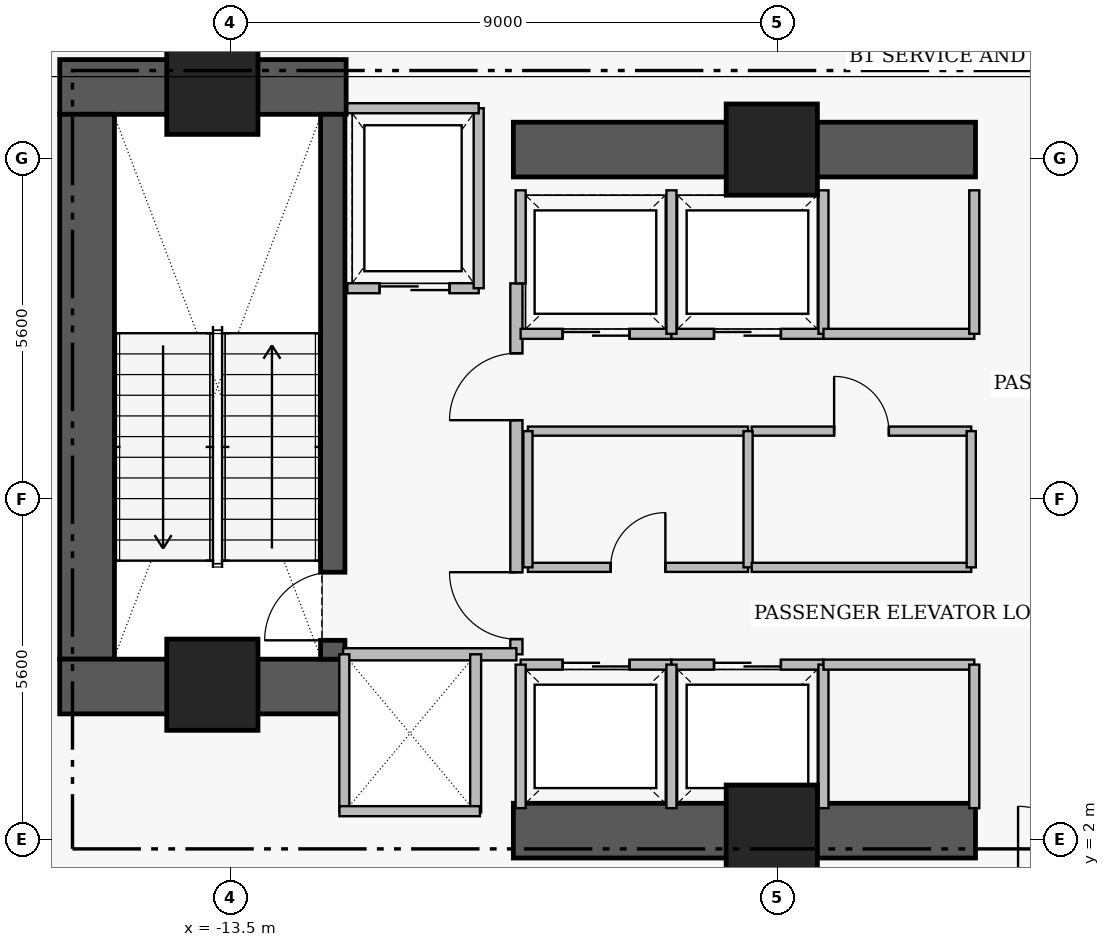
"""IFC4 building model, lengths in metres.
Left out: names, types, materials, properties, quantities, classifications, styles, units other than length and angle.
Written with IfcOpenShell. Run it as: python <this file> out.ifc"""

import sys

from ifc_helpers import new_model, si_unit, direction, frame, frame_2d, origin, origin_2d, place, context, subcontext, project, spatial, rectangle, extrude, element, fill, save


model = new_model("IFC4")
c1 = context("Model", 3, precision=1e-05, world=origin(), true_north=direction((0.0, 1.0)))
c2 = subcontext(c1, "Body", "Model", "MODEL_VIEW")
j1 = project(units=[si_unit("LENGTHUNIT", "METRE"), si_unit("PLANEANGLEUNIT", "RADIAN")], contexts=[c1])
p1 = place(None, origin())
s1 = spatial("IfcSite", under=j1, at=p1, CompositionType="ELEMENT")
p2 = place(p1, origin())
s2 = spatial("IfcBuilding", under=s1, at=p2, CompositionType="ELEMENT")
p3 = place(p2, frame((0.0, 0.0, -4.5)))
s3 = spatial("IfcBuildingStorey", under=s2, at=p3, CompositionType="ELEMENT", Elevation=-4.5)
p4 = place(p3, frame((-16.31, 14.38, 0.0), z_axis=(0.0, 0.0, 1.0), x_axis=(1.0, 0.0, 0.0)))
e1 = element("IfcWall", 1, at=p4, inside=s3, PredefinedType="SHEAR", context=c2, shape_type="SweptSolid", body=[
    extrude(rectangle(XDim=4.71, YDim=0.9, at=frame_2d((2.355, 0.0))), origin(), (0.0, 0.0, 1.0), 4.31),
])
p5 = place(p3, frame((-15.86, 4.97, 0.0), z_axis=(0.0, 0.0, 1.0), x_axis=(0.0, 1.0, 0.0)))
e2 = element("IfcWall", 2, at=p5, inside=s3, PredefinedType="SHEAR", context=c2, shape_type="SweptSolid", body=[
    extrude(rectangle(XDim=8.96, YDim=0.9, at=frame_2d((4.48, 0.0))), origin(), (0.0, 0.0, 1.0), 4.31),
])
p6 = place(p3, frame((-16.31, 4.52, 0.0), z_axis=(0.0, 0.0, 1.0), x_axis=(1.0, 0.0, 0.0)))
e3 = element("IfcWall", 3, at=p6, inside=s3, PredefinedType="SHEAR", context=c2, shape_type="SweptSolid", body=[
    extrude(rectangle(XDim=4.71, YDim=0.9, at=frame_2d((2.355, 0.0))), origin(), (0.0, 0.0, 1.0), 4.31),
])
for number, where, z_axis, x_axis in (
    (4, (-8.85, 2.15, 0.0), (0.0, 0.0, 1.0), (1.0, 0.0, 0.0)),
    (5, (-8.85, 13.35, 0.0), (0.0, 0.0, 1.0), (1.0, 0.0, 0.0)),
):
    element("IfcWall", number, at=place(p3, frame(where, z_axis=z_axis, x_axis=x_axis)), inside=s3, PredefinedType="SHEAR", context=c2, shape_type="SweptSolid", body=[
        extrude(rectangle(XDim=7.6, YDim=0.9, at=frame_2d((3.8, 0.0))), origin(), (0.0, 0.0, 1.0), 4.24),
    ])
p7 = place(p3, frame((-11.82, 4.97, 0.0), z_axis=(0.0, 0.0, 1.0), x_axis=(0.0, 1.0, 0.0)))
e6 = element("IfcWall", 6, at=p7, inside=s3, PredefinedType="SHEAR", context=c2, shape_type="SweptSolid", body=[
    extrude(rectangle(XDim=8.96, YDim=0.4, at=frame_2d((4.48, 0.0))), origin(), (0.0, 0.0, 1.0), 4.31),
])
p8 = place(p7, frame((0.31, 0.0, 0.0)))
e7 = element("IfcOpeningElement", 7, at=p8, cuts=e6, PredefinedType="OPENING", context=c2, shape_type="SweptSolid", body=[
    extrude(rectangle(XDim=1.12, YDim=2.22, at=frame_2d((0.56, 1.11))), frame((0.0, 0.21, 0.0), z_axis=(0.0, -1.0, 0.0), x_axis=(1.0, 0.0, 0.0)), (0.0, 0.0, 1.0), 0.42),
])
for number, where, z_axis, x_axis in (
    (8, (-13.8, 14.35, 0.0), (0.0, 0.0, 1.0), (1.0, 0.0, 0.0)),
    (9, (-4.6, 13.35, 0.0), (0.0, 0.0, 1.0), (1.0, 0.0, 0.0)),
    (10, (-13.8, 4.55, 0.0), (0.0, 0.0, 1.0), (1.0, 0.0, 0.0)),
    (11, (-4.6, 2.15, 0.0), (0.0, 0.0, 1.0), (1.0, 0.0, 0.0)),
):
    element("IfcColumn", number, at=place(p3, frame(where, z_axis=z_axis, x_axis=x_axis)), inside=s3, PredefinedType="COLUMN", context=c2, shape_type="SweptSolid", body=[
        extrude(rectangle(XDim=1.5, YDim=1.5, at=origin_2d()), origin(), (0.0, 0.0, 1.0), 4.5),
    ])
p9 = place(p3, frame((-8.8, 5.05, 0.0), z_axis=(0.0, 0.0, 1.0), x_axis=(0.0, 1.0, 0.0)))
e12 = element("IfcWall", 12, at=p9, inside=s3, PredefinedType="PARTITIONING", context=c2, shape_type="SweptSolid", body=[
    extrude(rectangle(XDim=6.1, YDim=0.2, at=frame_2d((3.05, 0.0))), origin(), (0.0, 0.0, 1.0), 4.24),
])
p10 = place(p9, frame((0.25, 0.0, 0.0)))
e13 = element("IfcOpeningElement", 13, at=p10, cuts=e12, PredefinedType="OPENING", context=c2, shape_type="SweptSolid", body=[
    extrude(rectangle(XDim=1.1, YDim=2.2, at=frame_2d((0.55, 1.1))), frame((0.0, 0.11, 0.0), z_axis=(0.0, -1.0, 0.0), x_axis=(1.0, 0.0, 0.0)), (0.0, 0.0, 1.0), 0.22),
])
p11 = place(p9, frame((3.85, 0.0, 0.0)))
e14 = element("IfcOpeningElement", 14, at=p11, cuts=e12, PredefinedType="OPENING", context=c2, shape_type="SweptSolid", body=[
    extrude(rectangle(XDim=1.1, YDim=2.2, at=frame_2d((0.55, 1.1))), frame((0.0, 0.11, 0.0), z_axis=(0.0, -1.0, 0.0), x_axis=(1.0, 0.0, 0.0)), (0.0, 0.0, 1.0), 0.22),
])
p12 = place(p3, frame((-11.58, 11.07, 0.0), z_axis=(0.0, 0.0, 1.0), x_axis=(1.0, 0.0, 0.0)))
e15 = element("IfcWall", 15, at=p12, inside=s3, PredefinedType="PARTITIONING", context=c2, shape_type="SweptSolid", body=[
    extrude(rectangle(XDim=2.16, YDim=0.165, at=frame_2d((1.08, 0.0))), origin(), (0.0, 0.0, 1.0), 4.24),
])
p13 = place(p12, frame((0.53, 0.0, 0.0)))
e16 = element("IfcOpeningElement", 16, at=p13, cuts=e15, PredefinedType="OPENING", context=c2, shape_type="SweptSolid", body=[
    extrude(rectangle(XDim=1.15, YDim=2.25, at=frame_2d((0.575, 1.125))), frame((0.0, 0.093, 0.0), z_axis=(0.0, -1.0, 0.0), x_axis=(1.0, 0.0, 0.0)), (0.0, 0.0, 1.0), 0.185),
])
p14 = place(p3, frame((-8.73, 4.88, 0.0), z_axis=(0.0, 0.0, 1.0), x_axis=(1.0, 0.0, 0.0)))
e17 = element("IfcWall", 17, at=p14, inside=s3, PredefinedType="PARTITIONING", context=c2, shape_type="SweptSolid", body=[
    extrude(rectangle(XDim=2.48, YDim=0.165, at=frame_2d((1.24, 0.0))), origin(), (0.0, 0.0, 1.0), 4.24),
])
p15 = place(p14, frame((0.69, 0.0, 0.0)))
e18 = element("IfcOpeningElement", 18, at=p15, cuts=e17, PredefinedType="OPENING", context=c2, shape_type="SweptSolid", body=[
    extrude(rectangle(XDim=1.1, YDim=2.25, at=frame_2d((0.55, 1.125))), frame((0.0, 0.093, 0.0), z_axis=(0.0, -1.0, 0.0), x_axis=(1.0, 0.0, 0.0)), (0.0, 0.0, 1.0), 0.185),
])
p16 = place(p3, frame((-6.25, 4.88, 0.0), z_axis=(0.0, 0.0, 1.0), x_axis=(1.0, 0.0, 0.0)))
e19 = element("IfcWall", 19, at=p16, inside=s3, PredefinedType="PARTITIONING", context=c2, shape_type="SweptSolid", body=[
    extrude(rectangle(XDim=2.5, YDim=0.165, at=frame_2d((1.25, 0.0))), origin(), (0.0, 0.0, 1.0), 4.24),
])
p17 = place(p16, frame((0.7, 0.0, 0.0)))
e20 = element("IfcOpeningElement", 20, at=p17, cuts=e19, PredefinedType="OPENING", context=c2, shape_type="SweptSolid", body=[
    extrude(rectangle(XDim=1.1, YDim=2.25, at=frame_2d((0.55, 1.125))), frame((0.0, 0.093, 0.0), z_axis=(0.0, -1.0, 0.0), x_axis=(1.0, 0.0, 0.0)), (0.0, 0.0, 1.0), 0.185),
])
p18 = place(p3, frame((-8.73, 10.32, 0.0), z_axis=(0.0, 0.0, 1.0), x_axis=(1.0, 0.0, 0.0)))
e21 = element("IfcWall", 21, at=p18, inside=s3, PredefinedType="PARTITIONING", context=c2, shape_type="SweptSolid", body=[
    extrude(rectangle(XDim=2.48, YDim=0.165, at=frame_2d((1.24, 0.0))), origin(), (0.0, 0.0, 1.0), 4.24),
])
p19 = place(p18, frame((0.69, 0.0, 0.0)))
e22 = element("IfcOpeningElement", 22, at=p19, cuts=e21, PredefinedType="OPENING", context=c2, shape_type="SweptSolid", body=[
    extrude(rectangle(XDim=1.1, YDim=2.25, at=frame_2d((0.55, 1.125))), frame((0.0, 0.093, 0.0), z_axis=(0.0, -1.0, 0.0), x_axis=(1.0, 0.0, 0.0)), (0.0, 0.0, 1.0), 0.185),
])
p20 = place(p3, frame((-6.25, 10.32, 0.0), z_axis=(0.0, 0.0, 1.0), x_axis=(1.0, 0.0, 0.0)))
e23 = element("IfcWall", 23, at=p20, inside=s3, PredefinedType="PARTITIONING", context=c2, shape_type="SweptSolid", body=[
    extrude(rectangle(XDim=2.5, YDim=0.165, at=frame_2d((1.25, 0.0))), origin(), (0.0, 0.0, 1.0), 4.24),
])
p21 = place(p20, frame((0.7, 0.0, 0.0)))
e24 = element("IfcOpeningElement", 24, at=p21, cuts=e23, PredefinedType="OPENING", context=c2, shape_type="SweptSolid", body=[
    extrude(rectangle(XDim=1.1, YDim=2.25, at=frame_2d((0.55, 1.125))), frame((0.0, 0.093, 0.0), z_axis=(0.0, -1.0, 0.0), x_axis=(1.0, 0.0, 0.0)), (0.0, 0.0, 1.0), 0.185),
])
p22 = place(p3, frame((-8.61, 6.48, 0.0), z_axis=(0.0, 0.0, 1.0), x_axis=(1.0, 0.0, 0.0)))
e25 = element("IfcWall", 25, at=p22, inside=s3, PredefinedType="PARTITIONING", context=c2, shape_type="SweptSolid", body=[
    extrude(rectangle(XDim=3.62, YDim=0.15, at=frame_2d((1.81, 0.0))), origin(), (0.0, 0.0, 1.0), 4.24),
])
p23 = place(p22, frame((1.36, 0.0, 0.0)))
e26 = element("IfcOpeningElement", 26, at=p23, cuts=e25, PredefinedType="OPENING", context=c2, shape_type="SweptSolid", body=[
    extrude(rectangle(XDim=0.9, YDim=2.15, at=frame_2d((0.45, 1.075))), frame((0.0, 0.085, 0.0), z_axis=(0.0, -1.0, 0.0), x_axis=(1.0, 0.0, 0.0)), (0.0, 0.0, 1.0), 0.17),
])
p24 = place(p3, frame((-4.93, 8.72, 0.0), z_axis=(0.0, 0.0, 1.0), x_axis=(1.0, 0.0, 0.0)))
e27 = element("IfcWall", 27, at=p24, inside=s3, PredefinedType="PARTITIONING", context=c2, shape_type="SweptSolid", body=[
    extrude(rectangle(XDim=3.61, YDim=0.15, at=frame_2d((1.805, 0.0))), origin(), (0.0, 0.0, 1.0), 4.24),
])
p25 = place(p24, frame((1.355, 0.0, 0.0)))
e28 = element("IfcOpeningElement", 28, at=p25, cuts=e27, PredefinedType="OPENING", context=c2, shape_type="SweptSolid", body=[
    extrude(rectangle(XDim=0.9, YDim=2.15, at=frame_2d((0.45, 1.075))), frame((0.0, 0.085, 0.0), z_axis=(0.0, -1.0, 0.0), x_axis=(1.0, 0.0, 0.0)), (0.0, 0.0, 1.0), 0.17),
])
p26 = place(p3, frame((-11.65, 5.05, 0.0), z_axis=(0.0, 0.0, 1.0), x_axis=(1.0, 0.0, 0.0)))
e29 = element("IfcWall", 29, at=p26, inside=s3, PredefinedType="PARTITIONING", context=c2, shape_type="SweptSolid", body=[
    extrude(rectangle(XDim=2.85, YDim=0.2, at=frame_2d((1.425, 0.0))), origin(), (0.0, 0.0, 1.0), 4.24),
])
p27 = place(p3, frame((-9.42, 11.07, 0.0), z_axis=(0.0, 0.0, 1.0), x_axis=(0.0, 1.0, 0.0)))
e30 = element("IfcWall", 30, at=p27, inside=s3, PredefinedType="PARTITIONING", context=c2, shape_type="SweptSolid", body=[
    extrude(rectangle(XDim=2.96, YDim=0.165, at=frame_2d((1.48, 0.0))), origin(), (0.0, 0.0, 1.0), 4.24),
])
p28 = place(p3, frame((-11.58, 14.03, 0.0), z_axis=(0.0, 0.0, 1.0), x_axis=(1.0, 0.0, 0.0)))
e31 = element("IfcWall", 31, at=p28, inside=s3, PredefinedType="PARTITIONING", context=c2, shape_type="SweptSolid", body=[
    extrude(rectangle(XDim=2.16, YDim=0.165, at=frame_2d((1.08, 0.0))), origin(), (0.0, 0.0, 1.0), 4.24),
])
for number, where, z_axis, x_axis in (
    (32, (-8.73, 2.52, 0.0), (0.0, 0.0, 1.0), (0.0, 1.0, 0.0)),
    (33, (-6.25, 2.52, 0.0), (0.0, 0.0, 1.0), (0.0, 1.0, 0.0)),
    (34, (-3.75, 2.52, 0.0), (0.0, 0.0, 1.0), (0.0, 1.0, 0.0)),
):
    element("IfcWall", number, at=place(p3, frame(where, z_axis=z_axis, x_axis=x_axis)), inside=s3, PredefinedType="PARTITIONING", context=c2, shape_type="SweptSolid", body=[
        extrude(rectangle(XDim=2.36, YDim=0.165, at=frame_2d((1.18, 0.0))), origin(), (0.0, 0.0, 1.0), 4.24),
    ])
p29 = place(p3, frame((-8.73, 11.15, 0.0), z_axis=(0.0, 0.0, 1.0), x_axis=(0.0, 1.0, 0.0)))
e35 = element("IfcWall", 35, at=p29, inside=s3, PredefinedType="PARTITIONING", context=c2, shape_type="SweptSolid", body=[
    extrude(rectangle(XDim=1.53, YDim=0.165, at=frame_2d((0.765, 0.0))), origin(), (0.0, 0.0, 1.0), 4.24),
])
for number, where, z_axis, x_axis in (
    (36, (-6.25, 10.32, 0.0), (0.0, 0.0, 1.0), (0.0, 1.0, 0.0)),
    (37, (-3.75, 10.32, 0.0), (0.0, 0.0, 1.0), (0.0, 1.0, 0.0)),
):
    element("IfcWall", number, at=place(p3, frame(where, z_axis=z_axis, x_axis=x_axis)), inside=s3, PredefinedType="PARTITIONING", context=c2, shape_type="SweptSolid", body=[
        extrude(rectangle(XDim=2.36, YDim=0.165, at=frame_2d((1.18, 0.0))), origin(), (0.0, 0.0, 1.0), 4.24),
    ])
p30 = place(p3, frame((-3.75, 4.88, 0.0), z_axis=(0.0, 0.0, 1.0), x_axis=(1.0, 0.0, 0.0)))
e38 = element("IfcWall", 38, at=p30, inside=s3, PredefinedType="PARTITIONING", context=c2, shape_type="SweptSolid", body=[
    extrude(rectangle(XDim=2.48, YDim=0.165, at=frame_2d((1.24, 0.0))), origin(), (0.0, 0.0, 1.0), 4.24),
])
p31 = place(p3, frame((-1.27, 2.52, 0.0), z_axis=(0.0, 0.0, 1.0), x_axis=(0.0, 1.0, 0.0)))
e39 = element("IfcWall", 39, at=p31, inside=s3, PredefinedType="PARTITIONING", context=c2, shape_type="SweptSolid", body=[
    extrude(rectangle(XDim=2.36, YDim=0.165, at=frame_2d((1.18, 0.0))), origin(), (0.0, 0.0, 1.0), 4.24),
])
p32 = place(p3, frame((-3.75, 10.32, 0.0), z_axis=(0.0, 0.0, 1.0), x_axis=(1.0, 0.0, 0.0)))
e40 = element("IfcWall", 40, at=p32, inside=s3, PredefinedType="PARTITIONING", context=c2, shape_type="SweptSolid", body=[
    extrude(rectangle(XDim=2.48, YDim=0.165, at=frame_2d((1.24, 0.0))), origin(), (0.0, 0.0, 1.0), 4.24),
])
p33 = place(p3, frame((-1.27, 10.32, 0.0), z_axis=(0.0, 0.0, 1.0), x_axis=(0.0, 1.0, 0.0)))
e41 = element("IfcWall", 41, at=p33, inside=s3, PredefinedType="PARTITIONING", context=c2, shape_type="SweptSolid", body=[
    extrude(rectangle(XDim=2.36, YDim=0.165, at=frame_2d((1.18, 0.0))), origin(), (0.0, 0.0, 1.0), 4.24),
])
p34 = place(p3, frame((-9.47, 2.45, 0.0), z_axis=(0.0, 0.0, 1.0), x_axis=(0.0, 1.0, 0.0)))
e42 = element("IfcWall", 42, at=p34, inside=s3, PredefinedType="PARTITIONING", context=c2, shape_type="SweptSolid", body=[
    extrude(rectangle(XDim=2.6, YDim=0.18, at=frame_2d((1.3, 0.0))), origin(), (0.0, 0.0, 1.0), 4.24),
])
p35 = place(p3, frame((-11.63, 2.47, 0.0), z_axis=(0.0, 0.0, 1.0), x_axis=(0.0, 1.0, 0.0)))
e43 = element("IfcWall", 43, at=p35, inside=s3, PredefinedType="PARTITIONING", context=c2, shape_type="SweptSolid", body=[
    extrude(rectangle(XDim=2.58, YDim=0.165, at=frame_2d((1.29, 0.0))), origin(), (0.0, 0.0, 1.0), 4.24),
])
p36 = place(p3, frame((-11.71, 2.47, 0.0), z_axis=(0.0, 0.0, 1.0), x_axis=(1.0, 0.0, 0.0)))
e44 = element("IfcWall", 44, at=p36, inside=s3, PredefinedType="PARTITIONING", context=c2, shape_type="SweptSolid", body=[
    extrude(rectangle(XDim=2.31, YDim=0.165, at=frame_2d((1.155, 0.0))), origin(), (0.0, 0.0, 1.0), 2.84),
])
p37 = place(p3, frame((-8.61, 8.72, 0.0), z_axis=(0.0, 0.0, 1.0), x_axis=(1.0, 0.0, 0.0)))
e45 = element("IfcWall", 45, at=p37, inside=s3, PredefinedType="PARTITIONING", context=c2, shape_type="SweptSolid", body=[
    extrude(rectangle(XDim=3.62, YDim=0.15, at=frame_2d((1.81, 0.0))), origin(), (0.0, 0.0, 1.0), 4.24),
])
for number, where, z_axis, x_axis in (
    (46, (-8.61, 6.48, 0.0), (0.0, 0.0, 1.0), (0.0, 1.0, 0.0)),
    (47, (-4.99, 6.48, 0.0), (0.0, 0.0, 1.0), (0.0, 1.0, 0.0)),
):
    element("IfcWall", number, at=place(p3, frame(where, z_axis=z_axis, x_axis=x_axis)), inside=s3, PredefinedType="PARTITIONING", context=c2, shape_type="SweptSolid", body=[
        extrude(rectangle(XDim=2.24, YDim=0.15, at=frame_2d((1.12, 0.0))), origin(), (0.0, 0.0, 1.0), 4.24),
    ])
p38 = place(p3, frame((-4.93, 6.48, 0.0), z_axis=(0.0, 0.0, 1.0), x_axis=(1.0, 0.0, 0.0)))
e48 = element("IfcWall", 48, at=p38, inside=s3, PredefinedType="PARTITIONING", context=c2, shape_type="SweptSolid", body=[
    extrude(rectangle(XDim=3.61, YDim=0.15, at=frame_2d((1.805, 0.0))), origin(), (0.0, 0.0, 1.0), 4.24),
])
p39 = place(p3, frame((-1.32, 6.48, 0.0), z_axis=(0.0, 0.0, 1.0), x_axis=(0.0, 1.0, 0.0)))
e49 = element("IfcWall", 49, at=p39, inside=s3, PredefinedType="PARTITIONING", context=c2, shape_type="SweptSolid", body=[
    extrude(rectangle(XDim=2.24, YDim=0.15, at=frame_2d((1.12, 0.0))), origin(), (0.0, 0.0, 1.0), 4.24),
])
p40 = place(p8, origin())
e50 = element("IfcDoor", 50, at=p40, inside=s3, OperationType="SINGLE_SWING_LEFT", PredefinedType="DOOR", context=c2, shape_type="SweptSolid", body=[
    extrude(rectangle(XDim=1.12, YDim=2.22, at=frame_2d((0.56, 1.11))), frame((0.0, 0.025, 0.0), z_axis=(0.0, -1.0, 0.0), x_axis=(1.0, 0.0, 0.0)), (0.0, 0.0, 1.0), 0.05),
])
fill(e7, e50)
p41 = place(p10, origin())
e51 = element("IfcDoor", 51, at=p41, inside=s3, OperationType="SINGLE_SWING_RIGHT", PredefinedType="DOOR", context=c2, shape_type="SweptSolid", body=[
    extrude(rectangle(XDim=1.1, YDim=2.2, at=frame_2d((0.55, 1.1))), frame((0.0, 0.025, 0.0), z_axis=(0.0, -1.0, 0.0), x_axis=(1.0, 0.0, 0.0)), (0.0, 0.0, 1.0), 0.05),
])
fill(e13, e51)
p42 = place(p11, origin())
e52 = element("IfcDoor", 52, at=p42, inside=s3, OperationType="SINGLE_SWING_LEFT", PredefinedType="DOOR", context=c2, shape_type="SweptSolid", body=[
    extrude(rectangle(XDim=1.1, YDim=2.2, at=frame_2d((0.55, 1.1))), frame((0.0, 0.025, 0.0), z_axis=(0.0, -1.0, 0.0), x_axis=(1.0, 0.0, 0.0)), (0.0, 0.0, 1.0), 0.05),
])
fill(e14, e52)
p43 = place(p13, origin())
e53 = element("IfcDoor", 53, at=p43, inside=s3, OperationType="SLIDING_TO_LEFT", PredefinedType="DOOR", context=c2, shape_type="SweptSolid", body=[
    extrude(rectangle(XDim=1.15, YDim=2.25, at=frame_2d((0.575, 1.125))), frame((0.0, 0.025, 0.0), z_axis=(0.0, -1.0, 0.0), x_axis=(1.0, 0.0, 0.0)), (0.0, 0.0, 1.0), 0.05),
])
fill(e16, e53)
p44 = place(p15, origin())
e54 = element("IfcDoor", 54, at=p44, inside=s3, OperationType="SLIDING_TO_LEFT", PredefinedType="DOOR", context=c2, shape_type="SweptSolid", body=[
    extrude(rectangle(XDim=1.1, YDim=2.25, at=frame_2d((0.55, 1.125))), frame((0.0, 0.025, 0.0), z_axis=(0.0, -1.0, 0.0), x_axis=(1.0, 0.0, 0.0)), (0.0, 0.0, 1.0), 0.05),
])
fill(e18, e54)
p45 = place(p17, origin())
e55 = element("IfcDoor", 55, at=p45, inside=s3, OperationType="SLIDING_TO_LEFT", PredefinedType="DOOR", context=c2, shape_type="SweptSolid", body=[
    extrude(rectangle(XDim=1.1, YDim=2.25, at=frame_2d((0.55, 1.125))), frame((0.0, 0.025, 0.0), z_axis=(0.0, -1.0, 0.0), x_axis=(1.0, 0.0, 0.0)), (0.0, 0.0, 1.0), 0.05),
])
fill(e20, e55)
p46 = place(p19, origin())
e56 = element("IfcDoor", 56, at=p46, inside=s3, OperationType="SLIDING_TO_LEFT", PredefinedType="DOOR", context=c2, shape_type="SweptSolid", body=[
    extrude(rectangle(XDim=1.1, YDim=2.25, at=frame_2d((0.55, 1.125))), frame((0.0, 0.025, 0.0), z_axis=(0.0, -1.0, 0.0), x_axis=(1.0, 0.0, 0.0)), (0.0, 0.0, 1.0), 0.05),
])
fill(e22, e56)
p47 = place(p21, origin())
e57 = element("IfcDoor", 57, at=p47, inside=s3, OperationType="SLIDING_TO_LEFT", PredefinedType="DOOR", context=c2, shape_type="SweptSolid", body=[
    extrude(rectangle(XDim=1.1, YDim=2.25, at=frame_2d((0.55, 1.125))), frame((0.0, 0.025, 0.0), z_axis=(0.0, -1.0, 0.0), x_axis=(1.0, 0.0, 0.0)), (0.0, 0.0, 1.0), 0.05),
])
fill(e24, e57)
p48 = place(p23, origin())
e58 = element("IfcDoor", 58, at=p48, inside=s3, OperationType="SINGLE_SWING_RIGHT", PredefinedType="DOOR", context=c2, shape_type="SweptSolid", body=[
    extrude(rectangle(XDim=0.9, YDim=2.15, at=frame_2d((0.45, 1.075))), frame((0.0, 0.025, 0.0), z_axis=(0.0, -1.0, 0.0), x_axis=(1.0, 0.0, 0.0)), (0.0, 0.0, 1.0), 0.05),
])
fill(e26, e58)
p49 = place(p25, origin())
e59 = element("IfcDoor", 59, at=p49, inside=s3, OperationType="SINGLE_SWING_LEFT", PredefinedType="DOOR", context=c2, shape_type="SweptSolid", body=[
    extrude(rectangle(XDim=0.9, YDim=2.15, at=frame_2d((0.45, 1.075))), frame((0.0, 0.025, 0.0), z_axis=(0.0, -1.0, 0.0), x_axis=(1.0, 0.0, 0.0)), (0.0, 0.0, 1.0), 0.05),
])
fill(e28, e59)
save(model, sys.argv[1])
